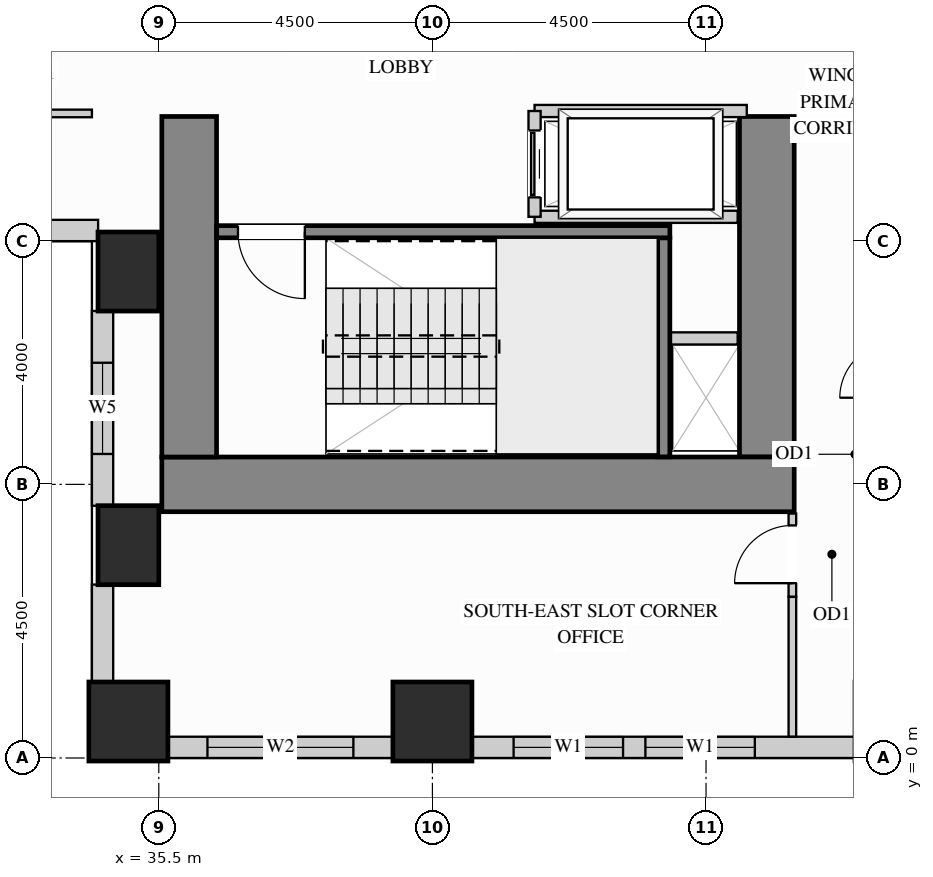
"""IFC4 building model, lengths in metres.
Left out: names, types, materials, properties, quantities, classifications, styles, units other than length and angle.
Written with IfcOpenShell. Run it as: python <this file> out.ifc"""

import sys

from ifc_helpers import new_model, si_unit, direction, frame, frame_2d, origin, origin_2d, place, context, subcontext, project, spatial, rectangle, extrude, source, transform, mapped, element, fill, save


model = new_model("IFC4")
c1 = context("Model", 3, precision=1e-05, world=origin(), true_north=direction((0.0, 1.0)))
c2 = subcontext(c1, "Body", "Model", "MODEL_VIEW")
j1 = project(units=[si_unit("LENGTHUNIT", "METRE"), si_unit("PLANEANGLEUNIT", "RADIAN")], contexts=[c1])
p1 = place(None, origin())
s1 = spatial("IfcSite", under=j1, at=p1, CompositionType="ELEMENT")
p2 = place(p1, origin())
s2 = spatial("IfcBuilding", under=s1, at=p2, CompositionType="ELEMENT")
p3 = place(p2, frame((0.0, 0.0, 40.5)))
s3 = spatial("IfcBuildingStorey", under=s2, at=p3, CompositionType="ELEMENT", Elevation=40.5)
m1 = source(origin(), c2, "Body", "SweptSolid", [
    extrude(rectangle(XDim=1.0, YDim=1.3, at=origin_2d()), origin(), (0.0, 0.0, 1.0), 3.38),
])
for number, where, z_axis, x_axis in (
    (1, (35.0, 3.5, 0.0), (0.0, 0.0, 1.0), (1.0, 0.0, 0.0)),
    (2, (35.0, 8.0, 0.0), (0.0, 0.0, 1.0), (1.0, 0.0, 0.0)),
):
    element("IfcColumn", number, at=place(p3, frame(where, z_axis=z_axis, x_axis=x_axis)), inside=s3, PredefinedType="COLUMN", context=c2, shape_type="MappedRepresentation", body=[
        mapped(m1, transform((0.0, 0.0, 0.0), x_axis=(1.0, 0.0, 0.0), y_axis=(0.0, 1.0, 0.0), z_axis=(0.0, 0.0, 1.0))),
    ])
m2 = source(origin(), c2, "Body", "SweptSolid", [
    extrude(rectangle(XDim=1.3, YDim=1.3, at=origin_2d()), origin(), (0.0, 0.0, 1.0), 3.38),
])
for number, where, z_axis, x_axis in (
    (3, (35.0, 0.6, 0.0), (0.0, 0.0, 1.0), (1.0, 0.0, 0.0)),
    (4, (40.0, 0.6, 0.0), (0.0, 0.0, 1.0), (1.0, 0.0, 0.0)),
):
    element("IfcColumn", number, at=place(p3, frame(where, z_axis=z_axis, x_axis=x_axis)), inside=s3, PredefinedType="COLUMN", context=c2, shape_type="MappedRepresentation", body=[
        mapped(m2, transform((0.0, 0.0, 0.0), x_axis=(1.0, 0.0, 0.0), y_axis=(0.0, 1.0, 0.0), z_axis=(0.0, 0.0, 1.0))),
    ])
m3 = source(origin(), c2, "Body", "SweptSolid", [
    extrude(rectangle(XDim=5.6, YDim=0.9, at=frame_2d((2.8, 0.0))), origin(), (0.0, 0.0, 1.0), 3.38),
])
p4 = place(p3, frame((45.5, 4.95, 0.0), z_axis=(0.0, 0.0, 1.0), x_axis=(0.0, 1.0, 0.0)))
e5 = element("IfcWall", 5, at=p4, inside=s3, PredefinedType="SHEAR", context=c2, shape_type="MappedRepresentation", body=[
    mapped(m3, transform((0.0, 0.0, 0.0), x_axis=(1.0, 0.0, 0.0), y_axis=(0.0, 1.0, 0.0), z_axis=(0.0, 0.0, 1.0))),
])
m4 = source(origin(), c2, "Body", "SweptSolid", [
    extrude(rectangle(XDim=10.4, YDim=0.9, at=frame_2d((5.2, 0.0))), origin(), (0.0, 0.0, 1.0), 3.38),
])
p5 = place(p3, frame((35.55, 4.5, 0.0), z_axis=(0.0, 0.0, 1.0), x_axis=(1.0, 0.0, 0.0)))
e6 = element("IfcWall", 6, at=p5, inside=s3, PredefinedType="SHEAR", context=c2, shape_type="MappedRepresentation", body=[
    mapped(m4, transform((0.0, 0.0, 0.0), x_axis=(1.0, 0.0, 0.0), y_axis=(0.0, 1.0, 0.0), z_axis=(0.0, 0.0, 1.0))),
])
p6 = place(p3, frame((36.0, 4.95, 0.0), z_axis=(0.0, 0.0, 1.0), x_axis=(0.0, 1.0, 0.0)))
e7 = element("IfcWall", 7, at=p6, inside=s3, PredefinedType="SHEAR", context=c2, shape_type="MappedRepresentation", body=[
    mapped(m3, transform((0.0, 0.0, 0.0), x_axis=(1.0, 0.0, 0.0), y_axis=(0.0, 1.0, 0.0), z_axis=(0.0, 0.0, 1.0))),
])
p7 = place(p3, frame((30.998, 8.675, 0.0), z_axis=(0.0, 0.0, 1.0), x_axis=(1.0, 0.0, 0.0)))
e8 = element("IfcWall", 8, at=p7, inside=s3, PredefinedType="SOLIDWALL", context=c2, shape_type="SweptSolid", body=[
    extrude(rectangle(XDim=3.504, YDim=0.35, at=frame_2d((1.752, 0.0))), origin(), (0.0, 0.0, 1.0), 3.365),
])
p8 = place(p7, frame((1.002, 0.0, 0.78)))
e9 = element("IfcOpeningElement", 9, at=p8, cuts=e8, PredefinedType="OPENING", context=c2, shape_type="SweptSolid", body=[
    extrude(rectangle(XDim=1.5, YDim=2.0, at=frame_2d((0.75, 1.0))), frame((0.0, 0.185, 0.0), z_axis=(0.0, -1.0, 0.0), x_axis=(1.0, 0.0, 0.0)), (0.0, 0.0, 1.0), 0.37),
])
p9 = place(p3, frame((34.575, 7.352, 0.0), z_axis=(0.0, 0.0, 1.0), x_axis=(0.0, -1.0, 0.0)))
e10 = element("IfcWall", 10, at=p9, inside=s3, PredefinedType="SOLIDWALL", context=c2, shape_type="SweptSolid", body=[
    extrude(rectangle(XDim=3.204, YDim=0.35, at=frame_2d((1.602, 0.0))), origin(), (0.0, 0.0, 1.0), 2.51),
])
p10 = place(p9, frame((0.852, 0.0, 0.78)))
e11 = element("IfcOpeningElement", 11, at=p10, cuts=e10, PredefinedType="OPENING", context=c2, shape_type="SweptSolid", body=[
    extrude(rectangle(XDim=1.5, YDim=1.55, at=frame_2d((0.75, 0.775))), frame((0.0, 0.185, 0.0), z_axis=(0.0, -1.0, 0.0), x_axis=(1.0, 0.0, 0.0)), (0.0, 0.0, 1.0), 0.37),
])
m5 = source(origin(), c2, "Body", "SweptSolid", [
    extrude(rectangle(XDim=1.604, YDim=0.35, at=frame_2d((0.802, 0.0))), origin(), (0.0, 0.0, 1.0), 2.51),
])
p11 = place(p3, frame((34.575, 2.852, 0.0), z_axis=(0.0, 0.0, 1.0), x_axis=(0.0, -1.0, 0.0)))
e12 = element("IfcWall", 12, at=p11, inside=s3, PredefinedType="SOLIDWALL", context=c2, shape_type="MappedRepresentation", body=[
    mapped(m5, transform((0.0, 0.0, 0.0), x_axis=(1.0, 0.0, 0.0), y_axis=(0.0, 1.0, 0.0), z_axis=(0.0, 0.0, 1.0))),
])
p12 = place(p3, frame((35.648, 0.175, 0.0), z_axis=(0.0, 0.0, 1.0), x_axis=(1.0, 0.0, 0.0)))
e13 = element("IfcWall", 13, at=p12, inside=s3, PredefinedType="SOLIDWALL", context=c2, shape_type="SweptSolid", body=[
    extrude(rectangle(XDim=3.704, YDim=0.35, at=frame_2d((1.852, 0.0))), origin(), (0.0, 0.0, 1.0), 2.51),
])
p13 = place(p12, frame((0.652, 0.0, 0.78)))
e14 = element("IfcOpeningElement", 14, at=p13, cuts=e13, PredefinedType="OPENING", context=c2, shape_type="SweptSolid", body=[
    extrude(rectangle(XDim=2.4, YDim=1.55, at=frame_2d((1.2, 0.775))), frame((0.0, 0.185, 0.0), z_axis=(0.0, -1.0, 0.0), x_axis=(1.0, 0.0, 0.0)), (0.0, 0.0, 1.0), 0.37),
])
p14 = place(p3, frame((40.648, 0.175, 0.0), z_axis=(0.0, 0.0, 1.0), x_axis=(1.0, 0.0, 0.0)))
e15 = element("IfcWall", 15, at=p14, inside=s3, PredefinedType="SOLIDWALL", context=c2, shape_type="SweptSolid", body=[
    extrude(rectangle(XDim=6.304, YDim=0.35, at=frame_2d((3.152, 0.0))), origin(), (0.0, 0.0, 1.0), 2.51),
])
p15 = place(p14, frame((0.687, 0.0, 0.78)))
e16 = element("IfcOpeningElement", 16, at=p15, cuts=e15, PredefinedType="OPENING", context=c2, shape_type="SweptSolid", body=[
    extrude(rectangle(XDim=1.8, YDim=1.55, at=frame_2d((0.9, 0.775))), frame((0.0, 0.185, 0.0), z_axis=(0.0, -1.0, 0.0), x_axis=(1.0, 0.0, 0.0)), (0.0, 0.0, 1.0), 0.37),
])
p16 = place(p14, frame((2.855, 0.0, 0.78)))
e17 = element("IfcOpeningElement", 17, at=p16, cuts=e15, PredefinedType="OPENING", context=c2, shape_type="SweptSolid", body=[
    extrude(rectangle(XDim=1.8, YDim=1.55, at=frame_2d((0.9, 0.775))), frame((0.0, 0.185, 0.0), z_axis=(0.0, -1.0, 0.0), x_axis=(1.0, 0.0, 0.0)), (0.0, 0.0, 1.0), 0.37),
])
p17 = place(p3, frame((45.92, 2.65, 0.0), z_axis=(0.0, 0.0, 1.0), x_axis=(0.0, 1.0, 0.0)))
e18 = element("IfcWall", 18, at=p17, inside=s3, PredefinedType="PARTITIONING", context=c2, shape_type="SweptSolid", body=[
    extrude(rectangle(XDim=1.37, YDim=0.125, at=frame_2d((0.685, 0.0))), origin(), (0.0, 0.0, 1.0), 3.365),
])
p18 = place(p17, frame((0.225, 0.0, 0.0)))
e19 = element("IfcOpeningElement", 19, at=p18, cuts=e18, PredefinedType="OPENING", context=c2, shape_type="SweptSolid", body=[
    extrude(rectangle(XDim=0.95, YDim=2.15, at=frame_2d((0.475, 1.075))), frame((0.0, 0.073, 0.0), z_axis=(0.0, -1.0, 0.0), x_axis=(1.0, 0.0, 0.0)), (0.0, 0.0, 1.0), 0.145),
])
m6 = source(origin(), c2, "Body", "SweptSolid", [
    extrude(rectangle(XDim=2.298, YDim=0.125, at=frame_2d((1.149, 0.0))), origin(), (0.0, 0.0, 1.0), 3.365),
])
p19 = place(p3, frame((45.92, 0.352, 0.0), z_axis=(0.0, 0.0, 1.0), x_axis=(0.0, 1.0, 0.0)))
e20 = element("IfcWall", 20, at=p19, inside=s3, PredefinedType="PARTITIONING", context=c2, shape_type="MappedRepresentation", body=[
    mapped(m6, transform((0.0, 0.0, 0.0), x_axis=(1.0, 0.0, 0.0), y_axis=(0.0, 1.0, 0.0), z_axis=(0.0, 0.0, 1.0))),
])
p20 = place(p3, frame((26.95, 10.6, 0.0), z_axis=(0.0, 0.0, 1.0), x_axis=(1.0, 0.0, 0.0)))
e21 = element("IfcWall", 21, at=p20, inside=s3, PredefinedType="PARTITIONING", context=c2, shape_type="SweptSolid", body=[
    extrude(rectangle(XDim=7.45, YDim=0.125, at=frame_2d((3.725, 0.0))), origin(), (0.0, 0.0, 1.0), 3.365),
])
p21 = place(p20, frame((4.683, 0.0, 0.0)))
e22 = element("IfcOpeningElement", 22, at=p21, cuts=e21, PredefinedType="OPENING", context=c2, shape_type="SweptSolid", body=[
    extrude(rectangle(XDim=0.95, YDim=2.15, at=frame_2d((0.475, 1.075))), frame((0.0, 0.073, 0.0), z_axis=(0.0, -1.0, 0.0), x_axis=(1.0, 0.0, 0.0)), (0.0, 0.0, 1.0), 0.145),
])
m7 = source(origin(), c2, "Body", "SweptSolid", [
    extrude(rectangle(XDim=1.17, YDim=0.2, at=frame_2d((0.585, 0.0))), origin(), (0.0, 0.0, 1.0), 3.365),
])
p22 = place(p3, frame((43.85, 6.9, 0.0), z_axis=(0.0, 0.0, 1.0), x_axis=(1.0, 0.0, 0.0)))
e23 = element("IfcWall", 23, at=p22, inside=s3, PredefinedType="PARTITIONING", context=c2, shape_type="MappedRepresentation", body=[
    mapped(m7, transform((0.0, 0.0, 0.0), x_axis=(1.0, 0.0, 0.0), y_axis=(0.0, 1.0, 0.0), z_axis=(0.0, 0.0, 1.0))),
])
m8 = source(origin(), c2, "Body", "SweptSolid", [
    extrude(rectangle(XDim=3.49, YDim=0.2, at=frame_2d((1.745, 0.0))), origin(), (0.0, 0.0, 1.0), 3.365),
])
p23 = place(p3, frame((41.68, 10.64, 0.0), z_axis=(0.0, 0.0, 1.0), x_axis=(1.0, 0.0, 0.0)))
e24 = element("IfcWall", 24, at=p23, inside=s3, PredefinedType="PARTITIONING", context=c2, shape_type="MappedRepresentation", body=[
    mapped(m8, transform((0.0, 0.0, 0.0), x_axis=(1.0, 0.0, 0.0), y_axis=(0.0, 1.0, 0.0), z_axis=(0.0, 0.0, 1.0))),
])
m9 = source(origin(), c2, "Body", "SweptSolid", [
    extrude(rectangle(XDim=3.34, YDim=0.2, at=frame_2d((1.67, 0.0))), origin(), (0.0, 0.0, 1.0), 3.365),
])
p24 = place(p3, frame((41.68, 8.9, 0.0), z_axis=(0.0, 0.0, 1.0), x_axis=(1.0, 0.0, 0.0)))
e25 = element("IfcWall", 25, at=p24, inside=s3, PredefinedType="PARTITIONING", context=c2, shape_type="MappedRepresentation", body=[
    mapped(m9, transform((0.0, 0.0, 0.0), x_axis=(1.0, 0.0, 0.0), y_axis=(0.0, 1.0, 0.0), z_axis=(0.0, 0.0, 1.0))),
])
p25 = place(p3, frame((41.68, 8.9, 0.0), z_axis=(0.0, 0.0, 1.0), x_axis=(0.0, 1.0, 0.0)))
e26 = element("IfcWall", 26, at=p25, inside=s3, PredefinedType="PARTITIONING", context=c2, shape_type="SweptSolid", body=[
    extrude(rectangle(XDim=1.74, YDim=0.2, at=frame_2d((0.87, 0.0))), origin(), (0.0, 0.0, 1.0), 3.365),
])
p26 = place(p25, frame((0.32, 0.0, 0.0)))
e27 = element("IfcOpeningElement", 27, at=p26, cuts=e26, PredefinedType="OPENING", context=c2, shape_type="SweptSolid", body=[
    extrude(rectangle(XDim=1.1, YDim=2.2, at=frame_2d((0.55, 1.1))), frame((0.0, 0.11, 0.0), z_axis=(0.0, -1.0, 0.0), x_axis=(1.0, 0.0, 0.0)), (0.0, 0.0, 1.0), 0.22),
])
m10 = source(origin(), c2, "Body", "SweptSolid", [
    extrude(rectangle(XDim=3.603, YDim=0.2, at=frame_2d((1.802, 0.0))), origin(), (0.0, 0.0, 1.0), 3.38),
])
p27 = place(p3, frame((43.805, 4.952, 0.0), z_axis=(0.0, 0.0, 1.0), x_axis=(0.0, 1.0, 0.0)))
e28 = element("IfcWall", 28, at=p27, inside=s3, PredefinedType="SHEAR", context=c2, shape_type="MappedRepresentation", body=[
    mapped(m10, transform((0.0, 0.0, 0.0), x_axis=(1.0, 0.0, 0.0), y_axis=(0.0, 1.0, 0.0), z_axis=(0.0, 0.0, 1.0))),
])
p28 = place(p3, frame((36.452, 8.655, 0.0), z_axis=(0.0, 0.0, 1.0), x_axis=(1.0, 0.0, 0.0)))
e29 = element("IfcWall", 29, at=p28, inside=s3, PredefinedType="SHEAR", context=c2, shape_type="SweptSolid", body=[
    extrude(rectangle(XDim=7.453, YDim=0.2, at=frame_2d((3.727, 0.0))), origin(), (0.0, 0.0, 1.0), 3.38),
])
p29 = place(p28, frame((0.35, 0.0, 0.0)))
e30 = element("IfcOpeningElement", 30, at=p29, cuts=e29, PredefinedType="OPENING", context=c2, shape_type="SweptSolid", body=[
    extrude(rectangle(XDim=1.1, YDim=2.15, at=frame_2d((0.55, 1.075))), frame((0.0, 0.11, 0.0), z_axis=(0.0, -1.0, 0.0), x_axis=(1.0, 0.0, 0.0)), (0.0, 0.0, 1.0), 0.22),
])
m11 = source(origin(), c2, "Body", "SweptSolid", [
    extrude(rectangle(XDim=1.1, YDim=2.2, at=frame_2d((0.55, 1.1))), frame((0.0, 0.025, 0.0), z_axis=(0.0, -1.0, 0.0), x_axis=(1.0, 0.0, 0.0)), (0.0, 0.0, 1.0), 0.05),
])
p30 = place(p26, origin())
e31 = element("IfcDoor", 31, at=p30, inside=s3, OperationType="SLIDING_TO_LEFT", PredefinedType="DOOR", context=c2, shape_type="MappedRepresentation", body=[
    mapped(m11, transform((0.0, 0.0, 0.0), x_axis=(1.0, 0.0, 0.0), y_axis=(0.0, 1.0, 0.0), z_axis=(0.0, 0.0, 1.0))),
])
fill(e27, e31)
m12 = source(origin(), c2, "Body", "SweptSolid", [
    extrude(rectangle(XDim=0.95, YDim=2.15, at=frame_2d((0.475, 1.075))), frame((0.0, 0.025, 0.0), z_axis=(0.0, -1.0, 0.0), x_axis=(1.0, 0.0, 0.0)), (0.0, 0.0, 1.0), 0.05),
])
p31 = place(p18, origin())
e32 = element("IfcDoor", 32, at=p31, inside=s3, OperationType="SINGLE_SWING_LEFT", PredefinedType="DOOR", context=c2, shape_type="MappedRepresentation", body=[
    mapped(m12, transform((0.0, 0.0, 0.0), x_axis=(1.0, 0.0, 0.0), y_axis=(0.0, 1.0, 0.0), z_axis=(0.0, 0.0, 1.0))),
])
fill(e19, e32)
m13 = source(origin(), c2, "Body", "SweptSolid", [
    extrude(rectangle(XDim=1.1, YDim=2.15, at=frame_2d((0.55, 1.075))), frame((0.0, 0.025, 0.0), z_axis=(0.0, -1.0, 0.0), x_axis=(1.0, 0.0, 0.0)), (0.0, 0.0, 1.0), 0.05),
])
p32 = place(p29, origin())
e33 = element("IfcDoor", 33, at=p32, inside=s3, OperationType="SINGLE_SWING_RIGHT", PredefinedType="DOOR", context=c2, shape_type="MappedRepresentation", body=[
    mapped(m13, transform((0.0, 0.0, 0.0), x_axis=(1.0, 0.0, 0.0), y_axis=(0.0, 1.0, 0.0), z_axis=(0.0, 0.0, 1.0))),
])
fill(e30, e33)
m14 = source(origin(), c2, "Body", "SweptSolid", [
    extrude(rectangle(XDim=1.8, YDim=1.55, at=frame_2d((0.9, 0.775))), frame((0.0, 0.03, 0.0), z_axis=(0.0, -1.0, 0.0), x_axis=(1.0, 0.0, 0.0)), (0.0, 0.0, 1.0), 0.06),
])
p33 = place(p15, origin())
e34 = element("IfcWindow", 34, at=p33, inside=s3, PartitioningType="SINGLE_PANEL", PredefinedType="WINDOW", context=c2, shape_type="MappedRepresentation", body=[
    mapped(m14, transform((0.0, 0.0, 0.0), x_axis=(1.0, 0.0, 0.0), y_axis=(0.0, 1.0, 0.0), z_axis=(0.0, 0.0, 1.0))),
])
fill(e16, e34)
p34 = place(p16, origin())
e35 = element("IfcWindow", 35, at=p34, inside=s3, PartitioningType="SINGLE_PANEL", PredefinedType="WINDOW", context=c2, shape_type="MappedRepresentation", body=[
    mapped(m14, transform((0.0, 0.0, 0.0), x_axis=(1.0, 0.0, 0.0), y_axis=(0.0, 1.0, 0.0), z_axis=(0.0, 0.0, 1.0))),
])
fill(e17, e35)
m15 = source(origin(), c2, "Body", "SweptSolid", [
    extrude(rectangle(XDim=2.4, YDim=1.55, at=frame_2d((1.2, 0.775))), frame((0.0, 0.03, 0.0), z_axis=(0.0, -1.0, 0.0), x_axis=(1.0, 0.0, 0.0)), (0.0, 0.0, 1.0), 0.06),
])
p35 = place(p13, origin())
e36 = element("IfcWindow", 36, at=p35, inside=s3, PartitioningType="SINGLE_PANEL", PredefinedType="WINDOW", context=c2, shape_type="MappedRepresentation", body=[
    mapped(m15, transform((0.0, 0.0, 0.0), x_axis=(1.0, 0.0, 0.0), y_axis=(0.0, 1.0, 0.0), z_axis=(0.0, 0.0, 1.0))),
])
fill(e14, e36)
m16 = source(origin(), c2, "Body", "SweptSolid", [
    extrude(rectangle(XDim=1.5, YDim=1.55, at=frame_2d((0.75, 0.775))), frame((0.0, 0.03, 0.0), z_axis=(0.0, -1.0, 0.0), x_axis=(1.0, 0.0, 0.0)), (0.0, 0.0, 1.0), 0.06),
])
p36 = place(p10, origin())
e37 = element("IfcWindow", 37, at=p36, inside=s3, PartitioningType="SINGLE_PANEL", PredefinedType="WINDOW", context=c2, shape_type="MappedRepresentation", body=[
    mapped(m16, transform((0.0, 0.0, 0.0), x_axis=(1.0, 0.0, 0.0), y_axis=(0.0, 1.0, 0.0), z_axis=(0.0, 0.0, 1.0))),
])
fill(e11, e37)
save(model, sys.argv[1])
